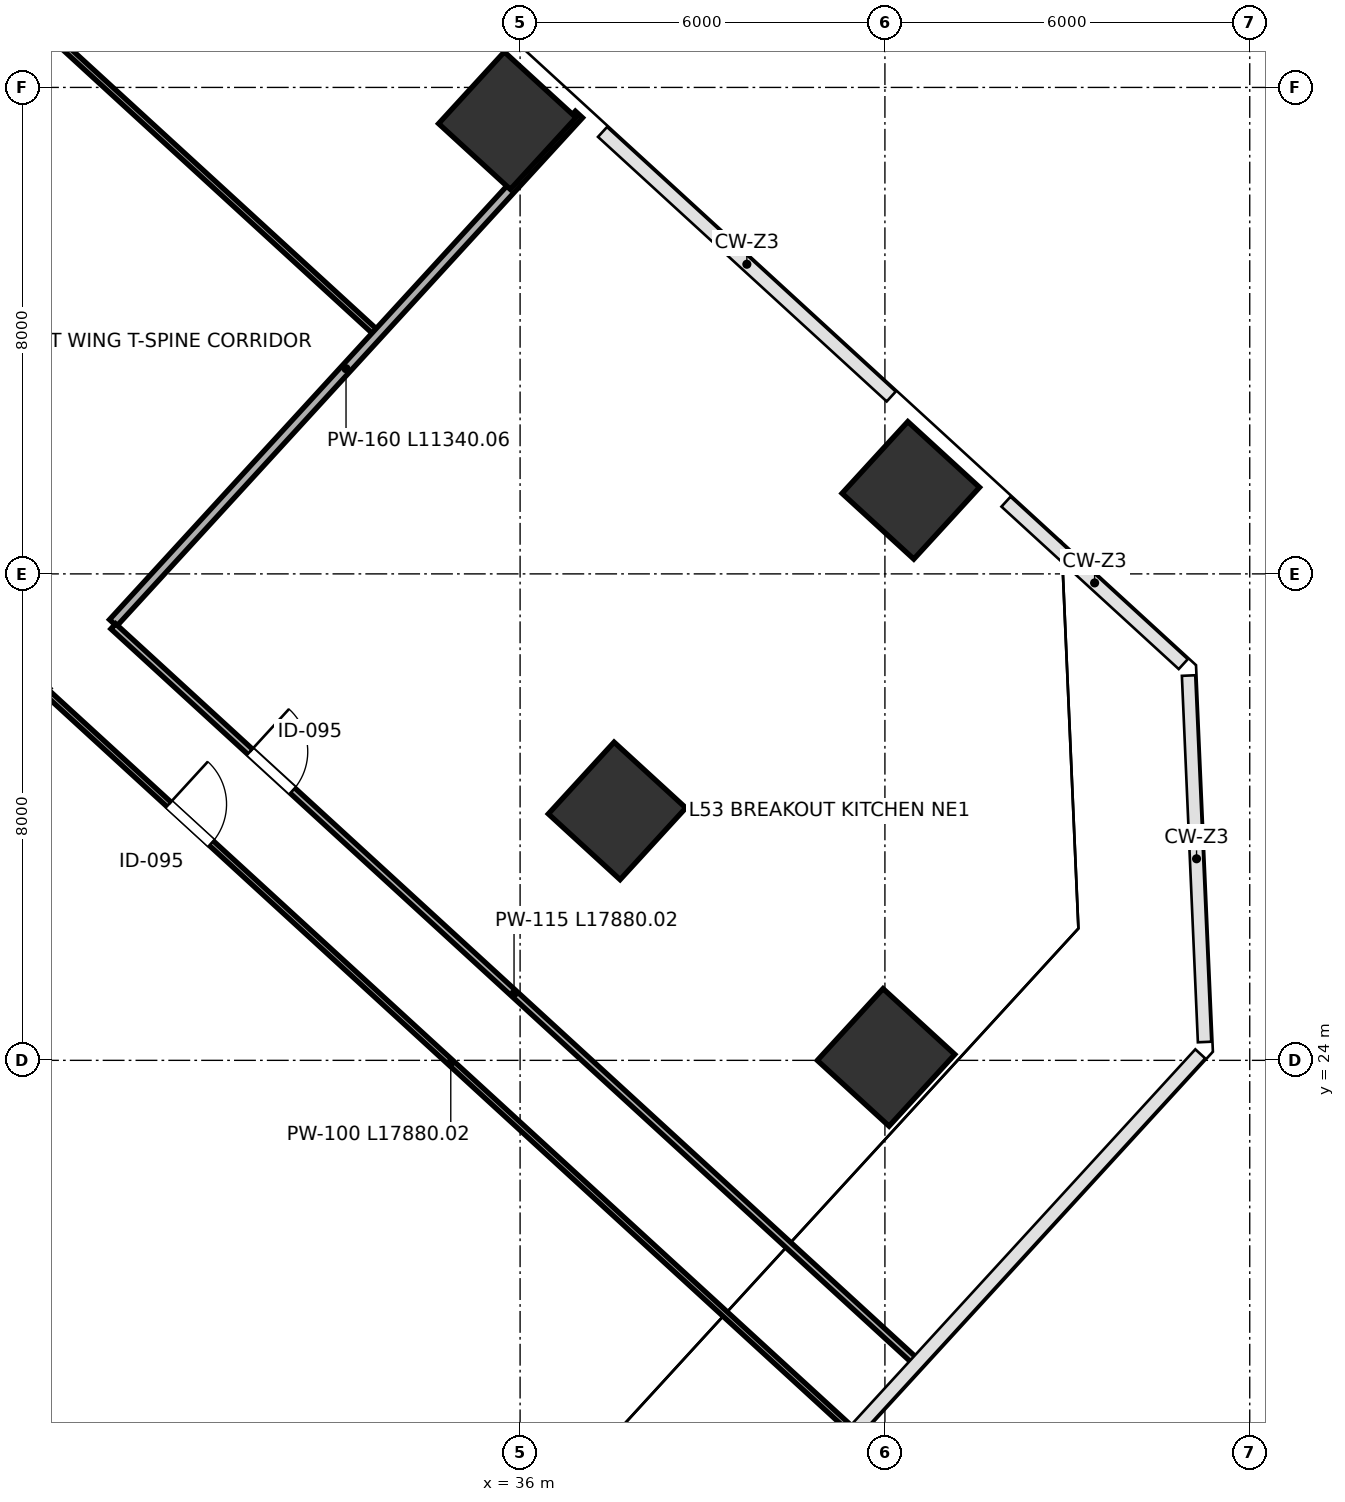
"""IFC4 building model, lengths in metres.
Left out: names, types, materials, properties, quantities, classifications, styles, units other than length and angle.
Written with IfcOpenShell. Run it as: python <this file> out.ifc"""

import sys

from ifc_helpers import new_model, si_unit, direction, frame, frame_2d, origin, origin_2d, place, context, subcontext, project, spatial, rectangle, extrude, source, transform, mapped, element, fill, save


model = new_model("IFC4")
c1 = context("Model", 3, precision=1e-05, world=origin(), true_north=direction((0.0, 1.0)))
c2 = subcontext(c1, "Body", "Model", "MODEL_VIEW")
j1 = project(units=[si_unit("LENGTHUNIT", "METRE"), si_unit("PLANEANGLEUNIT", "RADIAN")], contexts=[c1])
p1 = place(None, origin())
s1 = spatial("IfcSite", under=j1, at=p1, CompositionType="ELEMENT")
p2 = place(p1, origin())
s2 = spatial("IfcBuilding", under=s1, at=p2, CompositionType="ELEMENT")
p3 = place(p2, frame((0.0, 0.0, 237.4)))
s3 = spatial("IfcBuildingStorey", under=s2, at=p3, CompositionType="ELEMENT", Elevation=237.4)
m1 = source(origin(), c2, "Body", "SweptSolid", [
    extrude(rectangle(XDim=1.6, YDim=1.6, at=origin_2d()), origin(), (0.0, 0.0, 1.0), 4.199),
])
p4 = place(p3, frame((35.79, 39.454, 0.001), z_axis=(0.0, 0.0, 1.0), x_axis=(-0.73727733681, 0.675590207616, 0.0)))
e1 = element("IfcColumn", 1, at=p4, inside=s3, PredefinedType="COLUMN", context=c2, shape_type="MappedRepresentation", body=[
    mapped(m1, transform((0.0, 0.0, 0.0), scale=1.0)),
])
m2 = source(origin(), c2, "Body", "SweptSolid", [
    extrude(rectangle(XDim=1.6, YDim=1.6, at=origin_2d()), origin(), (0.0, 0.0, 1.0), 4.199),
])
p5 = place(p3, frame((37.595, 28.102, 0.001), z_axis=(0.0, 0.0, 1.0), x_axis=(-0.73727733681, 0.675590207616, 0.0)))
e2 = element("IfcColumn", 2, at=p5, inside=s3, PredefinedType="COLUMN", context=c2, shape_type="MappedRepresentation", body=[
    mapped(m2, transform((0.0, 0.0, 0.0), scale=1.0)),
])
for number, where, z_axis, x_axis in (
    (3, (42.426, 33.374, 0.001), (0.0, 0.0, 1.0), (-0.737, 0.676, 0.0)),
    (4, (42.019, 24.049, 0.001), (0.0, 0.0, 1.0), (-0.737, 0.676, 0.0)),
):
    element("IfcColumn", number, at=place(p3, frame(where, z_axis=z_axis, x_axis=x_axis)), inside=s3, PredefinedType="COLUMN", context=c2, shape_type="MappedRepresentation", body=[
        mapped(m1, transform((0.0, 0.0, 0.0), scale=1.0)),
    ])
p6 = place(p3, frame((17.504, 50.744, 0.0), z_axis=(0.0, 0.0, 1.0), x_axis=(0.737277850523, -0.675589646996, 0.0)))
e5 = element("IfcWall", 5, at=p6, inside=s3, PredefinedType="PARTITIONING", context=c2, shape_type="SweptSolid", body=[
    extrude(rectangle(XDim=21.87, YDim=0.1, at=frame_2d((10.935, 0.0))), origin(), (0.0, 0.0, 1.0), 3.96),
])
p7 = place(p6, frame((5.4, 0.0, 0.0)))
e6 = element("IfcOpeningElement", 6, at=p7, cuts=e5, PredefinedType="OPENING", context=c2, shape_type="SweptSolid", body=[
    extrude(rectangle(XDim=0.95, YDim=2.15, at=frame_2d((0.475, 1.075))), frame((0.0, 0.06, 0.0), z_axis=(0.0, -1.0, 0.0), x_axis=(1.0, 0.0, 0.0)), (0.0, 0.0, 1.0), 0.12),
])
p8 = place(p3, frame((29.307, 31.194, 0.0), z_axis=(0.0, 0.0, 1.0), x_axis=(0.67558228032, 0.73728460076, 0.0)))
e7 = element("IfcWall", 7, at=p8, inside=s3, PredefinedType="PARTITIONING", context=c2, shape_type="SweptSolid", body=[
    extrude(rectangle(XDim=11.34, YDim=0.16, at=frame_2d((5.67, 0.0))), origin(), (0.0, 0.0, 1.0), 3.195),
])
p9 = place(p3, frame((29.309, 31.138, 0.0), z_axis=(0.0, 0.0, 1.0), x_axis=(0.737278819957, -0.675588589041, 0.0)))
e8 = element("IfcWall", 8, at=p9, inside=s3, PredefinedType="PARTITIONING", context=c2, shape_type="SweptSolid", body=[
    extrude(rectangle(XDim=17.88, YDim=0.115, at=frame_2d((8.94, 0.0))), origin(), (0.0, 0.0, 1.0), 3.96),
])
p10 = place(p9, frame((3.05, 0.0, 0.0)))
e9 = element("IfcOpeningElement", 9, at=p10, cuts=e8, PredefinedType="OPENING", context=c2, shape_type="SweptSolid", body=[
    extrude(rectangle(XDim=0.95, YDim=2.15, at=frame_2d((0.475, 1.075))), frame((0.0, 0.067, 0.0), z_axis=(0.0, -1.0, 0.0), x_axis=(1.0, 0.0, 0.0)), (0.0, 0.0, 1.0), 0.135),
])
p11 = place(p3, frame((28.269, 30.002, 0.0), z_axis=(0.0, 0.0, 1.0), x_axis=(0.737272587758, -0.67559539026, 0.0)))
e10 = element("IfcWall", 10, at=p11, inside=s3, PredefinedType="PARTITIONING", context=c2, shape_type="SweptSolid", body=[
    extrude(rectangle(XDim=17.88, YDim=0.1, at=frame_2d((8.94, 0.0))), origin(), (0.0, 0.0, 1.0), 3.96),
])
p12 = place(p11, frame((2.65, 0.0, 0.0)))
e11 = element("IfcOpeningElement", 11, at=p12, cuts=e10, PredefinedType="OPENING", context=c2, shape_type="SweptSolid", body=[
    extrude(rectangle(XDim=0.95, YDim=2.15, at=frame_2d((0.475, 1.075))), frame((0.0, 0.06, 0.0), z_axis=(0.0, -1.0, 0.0), x_axis=(1.0, 0.0, 0.0)), (0.0, 0.0, 1.0), 0.12),
])
m3 = source(origin(), c2, "Body", "SweptSolid", [
    extrude(rectangle(XDim=0.95, YDim=2.15, at=frame_2d((0.475, 1.075))), frame((0.0, 0.025, 0.0), z_axis=(0.0, -1.0, 0.0), x_axis=(1.0, 0.0, 0.0)), (0.0, 0.0, 1.0), 0.05),
])
p13 = place(p10, origin())
e12 = element("IfcDoor", 12, at=p13, inside=s3, OperationType="SINGLE_SWING_LEFT", PredefinedType="DOOR", context=c2, shape_type="MappedRepresentation", body=[
    mapped(m3, transform((0.0, 0.0, 0.0), scale=1.0)),
])
fill(e9, e12)
p14 = place(p12, origin())
e13 = element("IfcDoor", 13, at=p14, inside=s3, OperationType="SINGLE_SWING_LEFT", PredefinedType="DOOR", context=c2, shape_type="MappedRepresentation", body=[
    mapped(m3, transform((0.0, 0.0, 0.0), scale=1.0)),
])
fill(e11, e13)
save(model, sys.argv[1])
